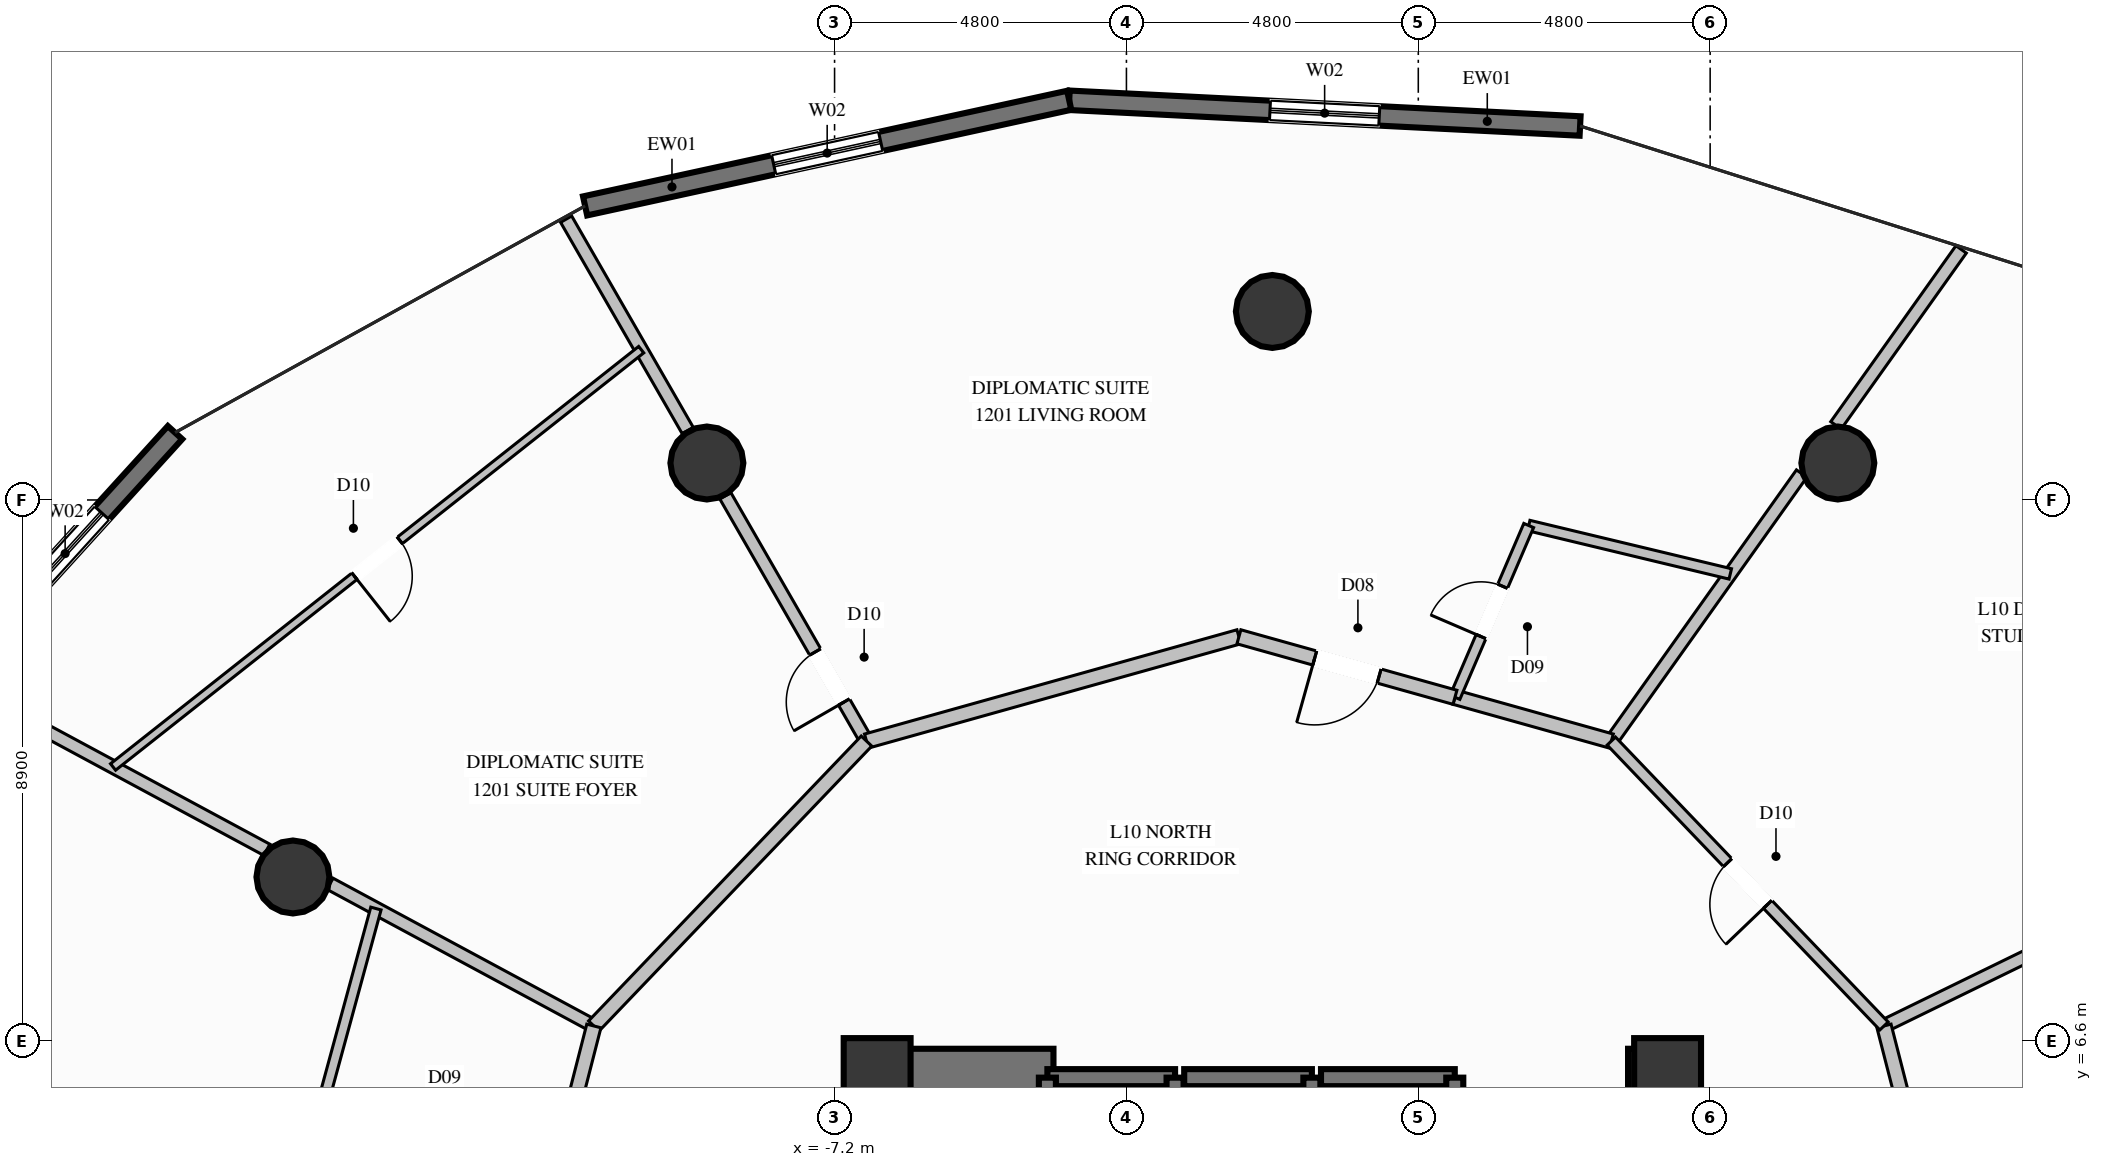
"""IFC4 building model, lengths in metres.
Left out: names, types, materials, properties, quantities, classifications, styles, units other than length and angle.
Written with IfcOpenShell. Run it as: python <this file> out.ifc"""

import sys

from ifc_helpers import new_model, si_unit, direction, frame, frame_2d, origin, origin_2d, place, context, subcontext, project, spatial, rectangle, circle, extrude, element, fill, save


model = new_model("IFC4")
c1 = context("Model", 3, precision=1e-05, world=origin(), true_north=direction((0.0, 1.0)))
c2 = subcontext(c1, "Body", "Model", "MODEL_VIEW")
j1 = project(units=[si_unit("LENGTHUNIT", "METRE"), si_unit("PLANEANGLEUNIT", "RADIAN")], contexts=[c1])
p1 = place(None, origin())
s1 = spatial("IfcSite", under=j1, at=p1, CompositionType="ELEMENT")
p2 = place(p1, origin())
s2 = spatial("IfcBuilding", under=s1, at=p2, CompositionType="ELEMENT")
p3 = place(p2, frame((0.0, 0.0, 46.4)))
s3 = spatial("IfcBuildingStorey", under=s2, at=p3, CompositionType="ELEMENT", Elevation=46.4)
for number, where, z_axis, x_axis in (
    (1, (6.5, 6.1, 0.0), (0.0, 0.0, 1.0), (1.0, 0.0, 0.0)),
    (2, (-6.5, 6.1, 0.0), (0.0, 0.0, 1.0), (1.0, 0.0, 0.0)),
):
    element("IfcColumn", number, at=place(p3, frame(where, z_axis=z_axis, x_axis=x_axis)), inside=s3, PredefinedType="COLUMN", context=c2, shape_type="SweptSolid", body=[
        extrude(rectangle(XDim=1.1, YDim=1.1, at=origin_2d()), origin(), (0.0, 0.0, 1.0), 3.6),
    ])
p4 = place(p3, frame((-6.125, 6.1, 0.0), z_axis=(0.0, 0.0, 1.0), x_axis=(1.0, 0.0, 0.0)))
e3 = element("IfcWall", 3, at=p4, inside=s3, PredefinedType="SHEAR", context=c2, shape_type="SweptSolid", body=[
    extrude(rectangle(XDim=2.525, YDim=0.75, at=frame_2d((1.262, 0.0))), origin(), (0.0, 0.0, 1.0), 3.6),
])
p5 = place(p3, frame((5.85, 6.1, 0.0), z_axis=(0.0, 0.0, 1.0), x_axis=(1.0, 0.0, 0.0)))
e4 = element("IfcWall", 4, at=p5, inside=s3, PredefinedType="SHEAR", context=c2, shape_type="SweptSolid", body=[
    extrude(rectangle(XDim=0.275, YDim=0.75, at=frame_2d((0.137, 0.0))), origin(), (0.0, 0.0, 1.0), 3.6),
])
p6 = place(p3, frame((-6.5, 2.35, 0.0), z_axis=(0.0, 0.0, 1.0), x_axis=(0.0, 1.0, 0.0)))
e5 = element("IfcWall", 5, at=p6, inside=s3, PredefinedType="SHEAR", context=c2, shape_type="SweptSolid", body=[
    extrude(rectangle(XDim=4.125, YDim=0.75, at=frame_2d((2.062, 0.0))), origin(), (0.0, 0.0, 1.0), 3.6),
])
p7 = place(p3, frame((6.5, 3.35, 0.0), z_axis=(0.0, 0.0, 1.0), x_axis=(0.0, 1.0, 0.0)))
e6 = element("IfcWall", 6, at=p7, inside=s3, PredefinedType="SHEAR", context=c2, shape_type="SweptSolid", body=[
    extrude(rectangle(XDim=3.125, YDim=0.75, at=frame_2d((1.562, 0.0))), origin(), (0.0, 0.0, 1.0), 3.6),
])
for number, where, z_axis, x_axis in (
    (7, (9.3, 16.108, 0.0), (0.0, 0.0, 1.0), (1.0, 0.0, 0.0)),
    (8, (0.0, 18.6, 0.0), (0.0, 0.0, 1.0), (1.0, 0.0, 0.0)),
    (9, (-9.3, 16.108, 0.0), (0.0, 0.0, 1.0), (1.0, 0.0, 0.0)),
    (10, (-16.108, 9.3, 0.0), (0.0, 0.0, 1.0), (1.0, 0.0, 0.0)),
):
    element("IfcColumn", number, at=place(p3, frame(where, z_axis=z_axis, x_axis=x_axis)), inside=s3, PredefinedType="COLUMN", context=c2, shape_type="SweptSolid", body=[
        extrude(circle(Radius=0.6, at=origin_2d()), origin(), (0.0, 0.0, 1.0), 3.6),
    ])
p8 = place(p3, frame((-3.341, 22.073, 0.0), z_axis=(0.0, 0.0, 1.0), x_axis=(0.998734545301, -0.050292226268, 0.0)))
e11 = element("IfcWall", 11, at=p8, inside=s3, PredefinedType="SOLIDWALL", context=c2, shape_type="SweptSolid", body=[
    extrude(rectangle(XDim=8.413, YDim=0.32, at=frame_2d((4.207, 0.0))), origin(), (0.0, 0.0, 1.0), 3.34),
])
p9 = place(p8, frame((3.306, 0.0, 0.35)))
e12 = element("IfcOpeningElement", 12, at=p9, cuts=e11, PredefinedType="OPENING", context=c2, shape_type="SweptSolid", body=[
    extrude(rectangle(XDim=1.8, YDim=2.6, at=frame_2d((0.9, 1.3))), frame((0.0, 0.17, 0.0), z_axis=(0.0, -1.0, 0.0), x_axis=(1.0, 0.0, 0.0)), (0.0, 0.0, 1.0), 0.34),
])
p10 = place(p3, frame((-11.303, 20.336, 0.0), z_axis=(0.0, 0.0, 1.0), x_axis=(0.977017916809, 0.213157196066, 0.0)))
e13 = element("IfcWall", 13, at=p10, inside=s3, PredefinedType="SOLIDWALL", context=c2, shape_type="SweptSolid", body=[
    extrude(rectangle(XDim=8.149, YDim=0.32, at=frame_2d((4.075, 0.0))), origin(), (0.0, 0.0, 1.0), 3.34),
])
p11 = place(p10, frame((3.175, 0.0, 0.35)))
e14 = element("IfcOpeningElement", 14, at=p11, cuts=e13, PredefinedType="OPENING", context=c2, shape_type="SweptSolid", body=[
    extrude(rectangle(XDim=1.8, YDim=2.6, at=frame_2d((0.9, 1.3))), frame((0.0, 0.17, 0.0), z_axis=(0.0, -1.0, 0.0), x_axis=(1.0, 0.0, 0.0)), (0.0, 0.0, 1.0), 0.34),
])
p12 = place(p3, frame((-22.911, 11.255, 0.0), z_axis=(0.0, 0.0, 1.0), x_axis=(0.67247451432, 0.740120279137, 0.0)))
e15 = element("IfcWall", 15, at=p12, inside=s3, PredefinedType="SOLIDWALL", context=c2, shape_type="SweptSolid", body=[
    extrude(rectangle(XDim=7.233, YDim=0.32, at=frame_2d((3.616, 0.0))), origin(), (0.0, 0.0, 1.0), 3.34),
])
p13 = place(p12, frame((3.645, 0.0, 0.35)))
e16 = element("IfcOpeningElement", 16, at=p13, cuts=e15, PredefinedType="OPENING", context=c2, shape_type="SweptSolid", body=[
    extrude(rectangle(XDim=1.8, YDim=2.6, at=frame_2d((0.9, 1.3))), frame((0.0, 0.17, 0.0), z_axis=(0.0, -1.0, 0.0), x_axis=(1.0, 0.0, 0.0)), (0.0, 0.0, 1.0), 0.34),
])
p14 = place(p3, frame((-1.6, 6.0, 0.0), z_axis=(0.0, 0.0, 1.0), x_axis=(-1.0, 0.0, 0.0)))
e17 = element("IfcWall", 17, at=p14, inside=s3, PredefinedType="SOLIDWALL", context=c2, shape_type="SweptSolid", body=[
    extrude(rectangle(XDim=2.1, YDim=0.28, at=frame_2d((1.05, 0.0))), origin(), (0.0, 0.0, 1.0), 3.34),
])
for number, where, z_axis, x_axis in (
    (18, (-3.7, 6.0, 0.0), (0.0, 0.0, 1.0), (0.0, -1.0, 0.0)),
    (19, (-1.6, 3.5, 0.0), (0.0, 0.0, 1.0), (0.0, 1.0, 0.0)),
):
    element("IfcWall", number, at=place(p3, frame(where, z_axis=z_axis, x_axis=x_axis)), inside=s3, PredefinedType="SOLIDWALL", context=c2, shape_type="SweptSolid", body=[
        extrude(rectangle(XDim=2.5, YDim=0.28, at=frame_2d((1.25, 0.0))), origin(), (0.0, 0.0, 1.0), 3.34),
    ])
p15 = place(p3, frame((0.65, 6.0, 0.0), z_axis=(0.0, 0.0, 1.0), x_axis=(-1.0, 0.0, 0.0)))
e20 = element("IfcWall", 20, at=p15, inside=s3, PredefinedType="SOLIDWALL", context=c2, shape_type="SweptSolid", body=[
    extrude(rectangle(XDim=2.1, YDim=0.28, at=frame_2d((1.05, 0.0))), origin(), (0.0, 0.0, 1.0), 3.34),
])
p16 = place(p3, frame((0.65, 3.5, 0.0), z_axis=(0.0, 0.0, 1.0), x_axis=(0.0, 1.0, 0.0)))
e21 = element("IfcWall", 21, at=p16, inside=s3, PredefinedType="SOLIDWALL", context=c2, shape_type="SweptSolid", body=[
    extrude(rectangle(XDim=2.5, YDim=0.28, at=frame_2d((1.25, 0.0))), origin(), (0.0, 0.0, 1.0), 3.34),
])
p17 = place(p3, frame((3.0, 6.0, 0.0), z_axis=(0.0, 0.0, 1.0), x_axis=(-1.0, 0.0, 0.0)))
e22 = element("IfcWall", 22, at=p17, inside=s3, PredefinedType="SOLIDWALL", context=c2, shape_type="SweptSolid", body=[
    extrude(rectangle(XDim=2.2, YDim=0.28, at=frame_2d((1.1, 0.0))), origin(), (0.0, 0.0, 1.0), 3.34),
])
p18 = place(p3, frame((3.0, 3.5, 0.0), z_axis=(0.0, 0.0, 1.0), x_axis=(0.0, 1.0, 0.0)))
e23 = element("IfcWall", 23, at=p18, inside=s3, PredefinedType="SOLIDWALL", context=c2, shape_type="SweptSolid", body=[
    extrude(rectangle(XDim=2.5, YDim=0.28, at=frame_2d((1.25, 0.0))), origin(), (0.0, 0.0, 1.0), 3.34),
])
p19 = place(p3, frame((10.059, 6.85, 0.0), z_axis=(0.0, 0.0, 1.0), x_axis=(0.898694403509, 0.438575385883, 0.0)))
e24 = element("IfcWall", 24, at=p19, inside=s3, PredefinedType="PARTITIONING", context=c2, shape_type="SweptSolid", body=[
    extrude(rectangle(XDim=6.085, YDim=0.21, at=frame_2d((3.043, 0.0))), origin(), (0.0, 0.0, 1.0), 2.709),
])
p20 = place(p3, frame((5.575, 11.535, 0.0), z_axis=(0.0, 0.0, 1.0), x_axis=(0.579748671229, 0.814795359712, 0.0)))
e25 = element("IfcWall", 25, at=p20, inside=s3, PredefinedType="PARTITIONING", context=c2, shape_type="SweptSolid", body=[
    extrude(rectangle(XDim=5.399, YDim=0.21, at=frame_2d((2.7, 0.0))), origin(), (0.0, 0.0, 1.0), 2.709),
])
p21 = place(p3, frame((9.269, 16.727, 0.0), z_axis=(0.0, 0.0, 1.0), x_axis=(0.579683056025, 0.814842042704, 0.0)))
e26 = element("IfcWall", 26, at=p21, inside=s3, PredefinedType="PARTITIONING", context=c2, shape_type="SweptSolid", body=[
    extrude(rectangle(XDim=3.552, YDim=0.21, at=frame_2d((1.776, 0.0))), origin(), (0.0, 0.0, 1.0), 3.34),
])
p22 = place(p3, frame((-6.675, 11.535, 0.0), z_axis=(0.0, 0.0, 1.0), x_axis=(-0.498786523098, 0.866724872365, 0.0)))
e27 = element("IfcWall", 27, at=p22, inside=s3, PredefinedType="PARTITIONING", context=c2, shape_type="SweptSolid", body=[
    extrude(rectangle(XDim=4.653, YDim=0.21, at=frame_2d((2.327, 0.0))), origin(), (0.0, 0.0, 1.0), 2.709),
])
p23 = place(p22, frame((0.741, 0.0, 0.0)))
e28 = element("IfcOpeningElement", 28, at=p23, cuts=e27, PredefinedType="OPENING", context=c2, shape_type="SweptSolid", body=[
    extrude(rectangle(XDim=0.95, YDim=2.1, at=frame_2d((0.475, 1.05))), frame((0.0, 0.115, 0.0), z_axis=(0.0, -1.0, 0.0), x_axis=(1.0, 0.0, 0.0)), (0.0, 0.0, 1.0), 0.23),
])
p24 = place(p3, frame((-9.615, 16.642, 0.0), z_axis=(0.0, 0.0, 1.0), x_axis=(-0.498733039203, 0.866755649308, 0.0)))
e29 = element("IfcWall", 29, at=p24, inside=s3, PredefinedType="PARTITIONING", context=c2, shape_type="SweptSolid", body=[
    extrude(rectangle(XDim=4.01, YDim=0.21, at=frame_2d((2.005, 0.0))), origin(), (0.0, 0.0, 1.0), 3.34),
])
p25 = place(p3, frame((-11.159, 6.85, 0.0), z_axis=(0.0, 0.0, 1.0), x_axis=(-0.880348601535, 0.474327249665, 0.0)))
e30 = element("IfcWall", 30, at=p25, inside=s3, PredefinedType="PARTITIONING", context=c2, shape_type="SweptSolid", body=[
    extrude(rectangle(XDim=4.929, YDim=0.21, at=frame_2d((2.464, 0.0))), origin(), (0.0, 0.0, 1.0), 2.709),
])
p26 = place(p3, frame((-16.537, 9.747, 0.0), z_axis=(0.0, 0.0, 1.0), x_axis=(-0.880366830353, 0.47429341553, 0.0)))
e31 = element("IfcWall", 31, at=p26, inside=s3, PredefinedType="PARTITIONING", context=c2, shape_type="SweptSolid", body=[
    extrude(rectangle(XDim=5.865, YDim=0.21, at=frame_2d((2.933, 0.0))), origin(), (0.0, 0.0, 1.0), 3.34),
])
p27 = place(p3, frame((5.575, 11.535, 0.0), z_axis=(0.0, 0.0, 1.0), x_axis=(-0.962983004146, 0.269562114782, 0.0)))
e32 = element("IfcWall", 32, at=p27, inside=s3, PredefinedType="PARTITIONING", context=c2, shape_type="SweptSolid", body=[
    extrude(rectangle(XDim=2.671, YDim=0.24, at=frame_2d((1.335, 0.0))), origin(), (0.0, 0.0, 1.0), 3.34),
])
p28 = place(p3, frame((7.531, 14.284, 0.0), z_axis=(0.0, 0.0, 1.0), x_axis=(-0.972350237733, 0.233527332836, 0.0)))
e33 = element("IfcWall", 33, at=p28, inside=s3, PredefinedType="PLUMBINGWALL", context=c2, shape_type="SweptSolid", body=[
    extrude(rectangle(XDim=3.409, YDim=0.175, at=frame_2d((1.705, 0.0))), origin(), (0.0, 0.0, 1.0), 3.34),
])
p29 = place(p3, frame((3.003, 12.255, 0.0), z_axis=(0.0, 0.0, 1.0), x_axis=(0.394561284207, 0.918869627861, 0.0)))
e34 = element("IfcWall", 34, at=p29, inside=s3, PredefinedType="PLUMBINGWALL", context=c2, shape_type="SweptSolid", body=[
    extrude(rectangle(XDim=3.075, YDim=0.175, at=frame_2d((1.537, 0.0))), origin(), (0.0, 0.0, 1.0), 3.34),
])
p30 = place(p29, frame((1.087, 0.0, 0.0)))
e35 = element("IfcOpeningElement", 35, at=p30, cuts=e34, PredefinedType="OPENING", context=c2, shape_type="SweptSolid", body=[
    extrude(rectangle(XDim=0.9, YDim=2.1, at=frame_2d((0.45, 1.05))), frame((0.0, 0.098, 0.0), z_axis=(0.0, -1.0, 0.0), x_axis=(1.0, 0.0, 0.0)), (0.0, 0.0, 1.0), 0.195),
])
p31 = place(p3, frame((-0.55, 13.25, 0.0), z_axis=(0.0, 0.0, 1.0), x_axis=(-0.962960431872, -0.269642738915, 0.0)))
e36 = element("IfcWall", 36, at=p31, inside=s3, PredefinedType="PARTITIONING", context=c2, shape_type="SweptSolid", body=[
    extrude(rectangle(XDim=6.361, YDim=0.24, at=frame_2d((3.18, 0.0))), origin(), (0.0, 0.0, 1.0), 3.34),
])
p32 = place(p3, frame((3.003, 12.255, 0.0), z_axis=(0.0, 0.0, 1.0), x_axis=(-0.962944088122, 0.269701099648, 0.0)))
e37 = element("IfcWall", 37, at=p32, inside=s3, PredefinedType="PARTITIONING", context=c2, shape_type="SweptSolid", body=[
    extrude(rectangle(XDim=3.69, YDim=0.24, at=frame_2d((1.845, 0.0))), origin(), (0.0, 0.0, 1.0), 3.34),
])
p33 = place(p32, frame((1.295, 0.0, 0.0)))
e38 = element("IfcOpeningElement", 38, at=p33, cuts=e37, PredefinedType="OPENING", context=c2, shape_type="SweptSolid", body=[
    extrude(rectangle(XDim=1.1, YDim=2.3, at=frame_2d((0.55, 1.15))), frame((0.0, 0.13, 0.0), z_axis=(0.0, -1.0, 0.0), x_axis=(1.0, 0.0, 0.0)), (0.0, 0.0, 1.0), 0.26),
])
p34 = place(p3, frame((-6.675, 11.535, 0.0), z_axis=(0.0, 0.0, 1.0), x_axis=(-0.691444859665, -0.722429239471, 0.0)))
e39 = element("IfcWall", 39, at=p34, inside=s3, PredefinedType="PARTITIONING", context=c2, shape_type="SweptSolid", body=[
    extrude(rectangle(XDim=6.485, YDim=0.24, at=frame_2d((3.242, 0.0))), origin(), (0.0, 0.0, 1.0), 3.34),
])
p35 = place(p3, frame((-10.38, 17.972, 0.0), z_axis=(0.0, 0.0, 1.0), x_axis=(-0.784634878258, -0.619958150056, 0.0)))
e40 = element("IfcWall", 40, at=p35, inside=s3, PredefinedType="PARTITIONING", context=c2, shape_type="SweptSolid", body=[
    extrude(rectangle(XDim=11.07, YDim=0.135, at=frame_2d((5.535, 0.0))), origin(), (0.0, 0.0, 1.0), 3.34),
])
p36 = place(p35, frame((5.06, 0.0, 0.0)))
e41 = element("IfcOpeningElement", 41, at=p36, cuts=e40, PredefinedType="OPENING", context=c2, shape_type="SweptSolid", body=[
    extrude(rectangle(XDim=0.95, YDim=2.1, at=frame_2d((0.475, 1.05))), frame((0.0, 0.078, 0.0), z_axis=(0.0, -1.0, 0.0), x_axis=(1.0, 0.0, 0.0)), (0.0, 0.0, 1.0), 0.155),
])
p37 = place(p3, frame((-11.159, 6.85, 0.0), z_axis=(0.0, 0.0, 1.0), x_axis=(-0.248286444079, -0.968686658154, 0.0)))
e42 = element("IfcWall", 42, at=p37, inside=s3, PredefinedType="PARTITIONING", context=c2, shape_type="SweptSolid", body=[
    extrude(rectangle(XDim=2.775, YDim=0.24, at=frame_2d((1.387, 0.0))), origin(), (0.0, 0.0, 1.0), 3.34),
])
p38 = place(p3, frame((-14.743, 8.781, 0.0), z_axis=(0.0, 0.0, 1.0), x_axis=(-0.262983150331, -0.964800426328, 0.0)))
e43 = element("IfcWall", 43, at=p38, inside=s3, PredefinedType="PLUMBINGWALL", context=c2, shape_type="SweptSolid", body=[
    extrude(rectangle(XDim=3.693, YDim=0.175, at=frame_2d((1.846, 0.0))), origin(), (0.0, 0.0, 1.0), 3.34),
])
p39 = place(p3, frame((11.7, 0.45, 0.0), z_axis=(0.0, 0.0, 1.0), x_axis=(-0.248347790771, 0.968670932164, 0.0)))
e44 = element("IfcWall", 44, at=p39, inside=s3, PredefinedType="PARTITIONING", context=c2, shape_type="SweptSolid", body=[
    extrude(rectangle(XDim=6.607, YDim=0.24, at=frame_2d((3.304, 0.0))), origin(), (0.0, 0.0, 1.0), 3.34),
])
p40 = place(p3, frame((10.059, 6.85, 0.0), z_axis=(0.0, 0.0, 1.0), x_axis=(-0.691464507588, 0.722410433719, 0.0)))
e45 = element("IfcWall", 45, at=p40, inside=s3, PredefinedType="PARTITIONING", context=c2, shape_type="SweptSolid", body=[
    extrude(rectangle(XDim=6.485, YDim=0.19, at=frame_2d((3.242, 0.0))), origin(), (0.0, 0.0, 1.0), 3.34),
])
p41 = place(p40, frame((2.768, 0.0, 0.0)))
e46 = element("IfcOpeningElement", 46, at=p41, cuts=e45, PredefinedType="OPENING", context=c2, shape_type="SweptSolid", body=[
    extrude(rectangle(XDim=0.95, YDim=2.1, at=frame_2d((0.475, 1.05))), frame((0.0, 0.105, 0.0), z_axis=(0.0, -1.0, 0.0), x_axis=(1.0, 0.0, 0.0)), (0.0, 0.0, 1.0), 0.21),
])
p42 = place(p9, origin())
e47 = element("IfcWindow", 47, at=p42, inside=s3, PartitioningType="SINGLE_PANEL", PredefinedType="WINDOW", context=c2, shape_type="SweptSolid", body=[
    extrude(rectangle(XDim=1.8, YDim=2.6, at=frame_2d((0.9, 1.3))), frame((0.0, 0.03, 0.0), z_axis=(0.0, -1.0, 0.0), x_axis=(1.0, 0.0, 0.0)), (0.0, 0.0, 1.0), 0.06),
])
fill(e12, e47)
p43 = place(p11, origin())
e48 = element("IfcWindow", 48, at=p43, inside=s3, PartitioningType="SINGLE_PANEL", PredefinedType="WINDOW", context=c2, shape_type="SweptSolid", body=[
    extrude(rectangle(XDim=1.8, YDim=2.6, at=frame_2d((0.9, 1.3))), frame((0.0, 0.03, 0.0), z_axis=(0.0, -1.0, 0.0), x_axis=(1.0, 0.0, 0.0)), (0.0, 0.0, 1.0), 0.06),
])
fill(e14, e48)
p44 = place(p13, origin())
e49 = element("IfcWindow", 49, at=p44, inside=s3, PartitioningType="SINGLE_PANEL", PredefinedType="WINDOW", context=c2, shape_type="SweptSolid", body=[
    extrude(rectangle(XDim=1.8, YDim=2.6, at=frame_2d((0.9, 1.3))), frame((0.0, 0.03, 0.0), z_axis=(0.0, -1.0, 0.0), x_axis=(1.0, 0.0, 0.0)), (0.0, 0.0, 1.0), 0.06),
])
fill(e16, e49)
p45 = place(p30, origin())
e50 = element("IfcDoor", 50, at=p45, inside=s3, OperationType="SINGLE_SWING_LEFT", PredefinedType="DOOR", context=c2, shape_type="SweptSolid", body=[
    extrude(rectangle(XDim=0.9, YDim=2.1, at=frame_2d((0.45, 1.05))), frame((0.0, 0.025, 0.0), z_axis=(0.0, -1.0, 0.0), x_axis=(1.0, 0.0, 0.0)), (0.0, 0.0, 1.0), 0.05),
])
fill(e35, e50)
p46 = place(p33, origin())
e51 = element("IfcDoor", 51, at=p46, inside=s3, OperationType="SINGLE_SWING_RIGHT", PredefinedType="DOOR", context=c2, shape_type="SweptSolid", body=[
    extrude(rectangle(XDim=1.1, YDim=2.3, at=frame_2d((0.55, 1.15))), frame((0.0, 0.025, 0.0), z_axis=(0.0, -1.0, 0.0), x_axis=(1.0, 0.0, 0.0)), (0.0, 0.0, 1.0), 0.05),
])
fill(e38, e51)
p47 = place(p23, origin())
e52 = element("IfcDoor", 52, at=p47, inside=s3, OperationType="SINGLE_SWING_LEFT", PredefinedType="DOOR", context=c2, shape_type="SweptSolid", body=[
    extrude(rectangle(XDim=0.95, YDim=2.1, at=frame_2d((0.475, 1.05))), frame((0.0, 0.025, 0.0), z_axis=(0.0, -1.0, 0.0), x_axis=(1.0, 0.0, 0.0)), (0.0, 0.0, 1.0), 0.05),
])
fill(e28, e52)
p48 = place(p36, origin())
e53 = element("IfcDoor", 53, at=p48, inside=s3, OperationType="SINGLE_SWING_RIGHT", PredefinedType="DOOR", context=c2, shape_type="SweptSolid", body=[
    extrude(rectangle(XDim=0.95, YDim=2.1, at=frame_2d((0.475, 1.05))), frame((0.0, 0.025, 0.0), z_axis=(0.0, -1.0, 0.0), x_axis=(1.0, 0.0, 0.0)), (0.0, 0.0, 1.0), 0.05),
])
fill(e41, e53)
p49 = place(p41, origin())
e54 = element("IfcDoor", 54, at=p49, inside=s3, OperationType="SINGLE_SWING_LEFT", PredefinedType="DOOR", context=c2, shape_type="SweptSolid", body=[
    extrude(rectangle(XDim=0.95, YDim=2.1, at=frame_2d((0.475, 1.05))), frame((0.0, 0.025, 0.0), z_axis=(0.0, -1.0, 0.0), x_axis=(1.0, 0.0, 0.0)), (0.0, 0.0, 1.0), 0.05),
])
fill(e46, e54)
save(model, sys.argv[1])
